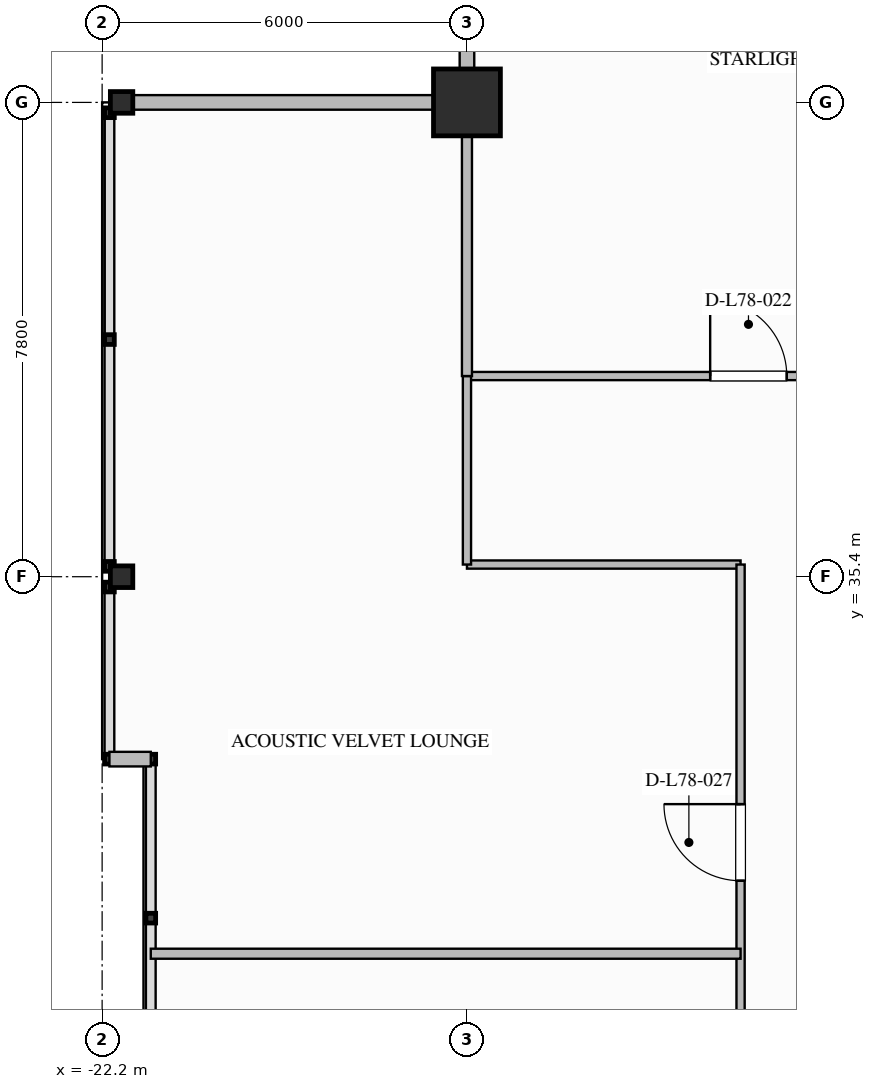
"""IFC4 building model, lengths in metres.
Left out: names, types, materials, properties, quantities, classifications, styles, units other than length and angle.
Written with IfcOpenShell. Run it as: python <this file> out.ifc"""

import sys

from ifc_helpers import new_model, si_unit, direction, frame, frame_2d, origin, origin_2d, place, context, subcontext, project, spatial, rectangle, i_section, extrude, element, fill, save


model = new_model("IFC4")
c1 = context("Model", 3, precision=1e-05, world=origin(), true_north=direction((0.0, 1.0)))
c2 = subcontext(c1, "Body", "Model", "MODEL_VIEW")
j1 = project(units=[si_unit("LENGTHUNIT", "METRE"), si_unit("PLANEANGLEUNIT", "RADIAN")], contexts=[c1])
p1 = place(None, origin())
s1 = spatial("IfcSite", under=j1, at=p1, CompositionType="ELEMENT")
p2 = place(p1, origin())
s2 = spatial("IfcBuilding", under=s1, at=p2, CompositionType="ELEMENT")
p3 = place(p2, frame((0.0, 0.0, 298.6)))
s3 = spatial("IfcBuildingStorey", under=s2, at=p3, CompositionType="ELEMENT", Elevation=298.6)
p4 = place(p3, frame((-16.2, 43.2, 0.0), z_axis=(0.0, 0.0, 1.0), x_axis=(1.0, 0.0, 0.0)))
e1 = element("IfcColumn", 1, at=p4, inside=s3, PredefinedType="COLUMN", context=c2, shape_type="SweptSolid", body=[
    extrude(rectangle(XDim=1.1, YDim=1.1, at=origin_2d()), origin(), (0.0, 0.0, 1.0), 4.4),
])
for number, where, z_axis, x_axis in (
    (2, (-21.88, 35.4, 0.0), (0.0, 0.0, 1.0), (1.0, 0.0, 0.0)),
    (3, (-21.88, 43.2, 0.0), (0.0, 0.0, 1.0), (1.0, 0.0, 0.0)),
):
    element("IfcColumn", number, at=place(p3, frame(where, z_axis=z_axis, x_axis=x_axis)), inside=s3, PredefinedType="COLUMN", context=c2, shape_type="SweptSolid", body=[
        extrude(i_section(OverallWidth=0.369, OverallDepth=0.356, WebThickness=0.011, FlangeThickness=0.018, FilletRadius=0.025, at=origin_2d()), origin(), (0.0, 0.0, 1.0), 4.397),
    ])
for number, where, z_axis, x_axis in (
    (4, (-22.08, 43.2, 0.0), (0.0, 0.0, 1.0), (1.0, 0.0, 0.0)),
    (5, (-16.2, 43.2, 0.0), (0.0, 0.0, 1.0), (0.0, 1.0, 0.0)),
):
    element("IfcWall", number, at=place(p3, frame(where, z_axis=z_axis, x_axis=x_axis)), inside=s3, PredefinedType="STANDARD", context=c2, shape_type="SweptSolid", body=[
        extrude(rectangle(XDim=5.88, YDim=0.24, at=frame_2d((2.94, 0.0))), origin(), (0.0, 0.0, 1.0), 3.439),
    ])
p5 = place(p3, frame((-21.4, 32.4, 0.0), z_axis=(0.0, 0.0, 1.0), x_axis=(-1.0, 0.0, 0.0)))
e6 = element("IfcWall", 6, at=p5, inside=s3, PredefinedType="STANDARD", context=c2, shape_type="SweptSolid", body=[
    extrude(rectangle(XDim=0.68, YDim=0.24, at=frame_2d((0.34, 0.0))), origin(), (0.0, 0.0, 1.0), 4.05),
])
p6 = place(p3, frame((-16.2, 38.7, 0.0), z_axis=(0.0, 0.0, 1.0), x_axis=(1.0, 0.0, 0.0)))
e7 = element("IfcWall", 7, at=p6, inside=s3, PredefinedType="PARTITIONING", context=c2, shape_type="SweptSolid", body=[
    extrude(rectangle(XDim=32.4, YDim=0.135, at=frame_2d((16.2, 0.0))), origin(), (0.0, 0.0, 1.0), 4.05),
])
p7 = place(p6, frame((4.0, 0.0, 0.0)))
e8 = element("IfcOpeningElement", 8, at=p7, cuts=e7, PredefinedType="OPENING", context=c2, shape_type="SweptSolid", body=[
    extrude(rectangle(XDim=1.26, YDim=2.2, at=frame_2d((0.63, 1.1))), frame((0.0, 0.077, 0.0), z_axis=(0.0, -1.0, 0.0), x_axis=(1.0, 0.0, 0.0)), (0.0, 0.0, 1.0), 0.155),
])
p8 = place(p6, frame((13.9, 0.0, 0.0)))
e9 = element("IfcOpeningElement", 9, at=p8, cuts=e7, PredefinedType="OPENING", context=c2, shape_type="SweptSolid", body=[
    extrude(rectangle(XDim=1.26, YDim=2.2, at=frame_2d((0.63, 1.1))), frame((0.0, 0.077, 0.0), z_axis=(0.0, -1.0, 0.0), x_axis=(1.0, 0.0, 0.0)), (0.0, 0.0, 1.0), 0.155),
])
p9 = place(p6, frame((25.5, 0.0, 0.0)))
e10 = element("IfcOpeningElement", 10, at=p9, cuts=e7, PredefinedType="OPENING", context=c2, shape_type="SweptSolid", body=[
    extrude(rectangle(XDim=0.92, YDim=2.1, at=frame_2d((0.46, 1.05))), frame((0.0, 0.077, 0.0), z_axis=(0.0, -1.0, 0.0), x_axis=(1.0, 0.0, 0.0)), (0.0, 0.0, 1.0), 0.155),
])
p10 = place(p6, frame((29.7, 0.0, 0.0)))
e11 = element("IfcOpeningElement", 11, at=p10, cuts=e7, PredefinedType="OPENING", context=c2, shape_type="SweptSolid", body=[
    extrude(rectangle(XDim=0.98, YDim=2.1, at=frame_2d((0.49, 1.05))), frame((0.0, 0.077, 0.0), z_axis=(0.0, -1.0, 0.0), x_axis=(1.0, 0.0, 0.0)), (0.0, 0.0, 1.0), 0.155),
])
p11 = place(p3, frame((-16.2, 35.6, 0.0), z_axis=(0.0, 0.0, 1.0), x_axis=(1.0, 0.0, 0.0)))
e12 = element("IfcWall", 12, at=p11, inside=s3, PredefinedType="PARTITIONING", context=c2, shape_type="SweptSolid", body=[
    extrude(rectangle(XDim=4.5, YDim=0.135, at=frame_2d((2.25, 0.0))), origin(), (0.0, 0.0, 1.0), 3.427),
])
p12 = place(p3, frame((-11.7, 18.4, 0.0), z_axis=(0.0, 0.0, 1.0), x_axis=(0.0, 1.0, 0.0)))
e13 = element("IfcWall", 13, at=p12, inside=s3, PredefinedType="PARTITIONING", context=c2, shape_type="SweptSolid", body=[
    extrude(rectangle(XDim=17.2, YDim=0.135, at=frame_2d((8.6, 0.0))), origin(), (0.0, 0.0, 1.0), 4.05),
])
p13 = place(p12, frame((2.5, 0.0, 0.0)))
e14 = element("IfcOpeningElement", 14, at=p13, cuts=e13, PredefinedType="OPENING", context=c2, shape_type="SweptSolid", body=[
    extrude(rectangle(XDim=1.26, YDim=2.2, at=frame_2d((0.63, 1.1))), frame((0.0, 0.077, 0.0), z_axis=(0.0, -1.0, 0.0), x_axis=(1.0, 0.0, 0.0)), (0.0, 0.0, 1.0), 0.155),
])
p14 = place(p12, frame((12.0, 0.0, 0.0)))
e15 = element("IfcOpeningElement", 15, at=p14, cuts=e13, PredefinedType="OPENING", context=c2, shape_type="SweptSolid", body=[
    extrude(rectangle(XDim=1.26, YDim=2.2, at=frame_2d((0.63, 1.1))), frame((0.0, 0.077, 0.0), z_axis=(0.0, -1.0, 0.0), x_axis=(1.0, 0.0, 0.0)), (0.0, 0.0, 1.0), 0.155),
])
p15 = place(p3, frame((-16.2, 35.6, 0.0), z_axis=(0.0, 0.0, 1.0), x_axis=(0.0, 1.0, 0.0)))
e16 = element("IfcWall", 16, at=p15, inside=s3, PredefinedType="PARTITIONING", context=c2, shape_type="SweptSolid", body=[
    extrude(rectangle(XDim=3.1, YDim=0.135, at=frame_2d((1.55, 0.0))), origin(), (0.0, 0.0, 1.0), 3.424),
])
p16 = place(p3, frame((-16.2, 38.7, 0.0), z_axis=(0.0, 0.0, 1.0), x_axis=(0.0, 1.0, 0.0)))
e17 = element("IfcWall", 17, at=p16, inside=s3, PredefinedType="PARTITIONING", context=c2, shape_type="SweptSolid", body=[
    extrude(rectangle(XDim=4.38, YDim=0.165, at=frame_2d((2.19, 0.0))), origin(), (0.0, 0.0, 1.0), 3.424),
])
p17 = place(p3, frame((-21.4, 29.2, 0.0), z_axis=(0.0, 0.0, 1.0), x_axis=(1.0, 0.0, 0.0)))
e18 = element("IfcWall", 18, at=p17, inside=s3, PredefinedType="PARTITIONING", context=c2, shape_type="SweptSolid", body=[
    extrude(rectangle(XDim=9.7, YDim=0.165, at=frame_2d((4.85, 0.0))), origin(), (0.0, 0.0, 1.0), 4.05),
])
p18 = place(p7, origin())
e19 = element("IfcDoor", 19, at=p18, inside=s3, OperationType="SINGLE_SWING_LEFT", PredefinedType="DOOR", context=c2, shape_type="SweptSolid", body=[
    extrude(rectangle(XDim=1.26, YDim=2.2, at=frame_2d((0.63, 1.1))), frame((0.0, 0.025, 0.0), z_axis=(0.0, -1.0, 0.0), x_axis=(1.0, 0.0, 0.0)), (0.0, 0.0, 1.0), 0.05),
])
fill(e8, e19)
p19 = place(p14, origin())
e20 = element("IfcDoor", 20, at=p19, inside=s3, OperationType="SINGLE_SWING_RIGHT", PredefinedType="DOOR", context=c2, shape_type="SweptSolid", body=[
    extrude(rectangle(XDim=1.26, YDim=2.2, at=frame_2d((0.63, 1.1))), frame((0.0, 0.025, 0.0), z_axis=(0.0, -1.0, 0.0), x_axis=(1.0, 0.0, 0.0)), (0.0, 0.0, 1.0), 0.05),
])
fill(e15, e20)
save(model, sys.argv[1])
